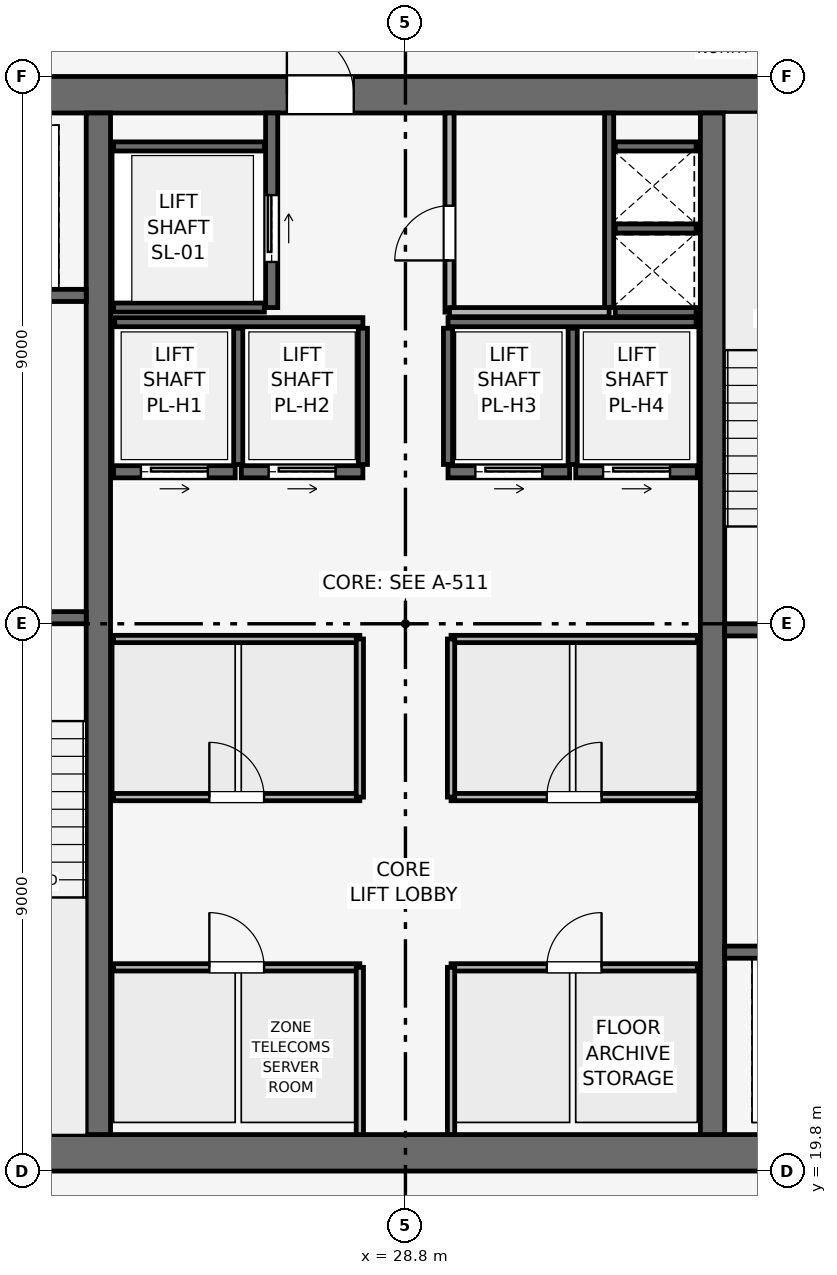
"""IFC4 building model, lengths in metres.
Left out: names, types, materials, properties, quantities, classifications, styles, units other than length and angle.
Written with IfcOpenShell. Run it as: python <this file> out.ifc"""

import sys

from ifc_helpers import new_model, si_unit, direction, frame, frame_2d, origin, place, context, subcontext, project, spatial, rectangle, extrude, element, fill, save


model = new_model("IFC4")
c1 = context("Model", 3, precision=1e-05, world=origin(), true_north=direction((0.0, 1.0)))
c2 = subcontext(c1, "Body", "Model", "MODEL_VIEW")
j1 = project(units=[si_unit("LENGTHUNIT", "METRE"), si_unit("PLANEANGLEUNIT", "RADIAN")], contexts=[c1])
p1 = place(None, origin())
s1 = spatial("IfcSite", under=j1, at=p1, CompositionType="ELEMENT")
p2 = place(p1, origin())
s2 = spatial("IfcBuilding", under=s1, at=p2, CompositionType="ELEMENT")
p3 = place(p2, frame((0.0, 0.0, 321.75)))
s3 = spatial("IfcBuildingStorey", under=s2, at=p3, CompositionType="ELEMENT", Elevation=321.75)
p4 = place(p3, frame((19.8, 20.1, 0.0), z_axis=(0.0, 0.0, 1.0), x_axis=(1.0, 0.0, 0.0)))
e1 = element("IfcWall", 1, at=p4, inside=s3, PredefinedType="SHEAR", context=c2, shape_type="SweptSolid", body=[
    extrude(rectangle(XDim=18.0, YDim=0.6, at=frame_2d((9.0, 0.0))), origin(), (0.0, 0.0, 1.0), 3.75),
])
p5 = place(p3, frame((19.8, 37.5, 0.0), z_axis=(0.0, 0.0, 1.0), x_axis=(1.0, 0.0, 0.0)))
e2 = element("IfcWall", 2, at=p5, inside=s3, PredefinedType="SHEAR", context=c2, shape_type="SweptSolid", body=[
    extrude(rectangle(XDim=18.0, YDim=0.6, at=frame_2d((9.0, 0.0))), origin(), (0.0, 0.0, 1.0), 3.75),
])
p6 = place(p5, frame((7.05, 0.0, 0.0)))
e3 = element("IfcOpeningElement", 3, at=p6, cuts=e2, PredefinedType="OPENING", context=c2, shape_type="SweptSolid", body=[
    extrude(rectangle(XDim=1.1, YDim=2.15, at=frame_2d((0.55, 1.075))), frame((0.0, 0.31, 0.0), z_axis=(0.0, -1.0, 0.0), x_axis=(1.0, 0.0, 0.0)), (0.0, 0.0, 1.0), 0.62),
])
for number, where, z_axis, x_axis in (
    (4, (23.75, 20.4, 0.0), (0.0, 0.0, 1.0), (0.0, 1.0, 0.0)),
    (5, (33.85, 20.4, 0.0), (0.0, 0.0, 1.0), (0.0, 1.0, 0.0)),
):
    element("IfcWall", number, at=place(p3, frame(where, z_axis=z_axis, x_axis=x_axis)), inside=s3, PredefinedType="SHEAR", context=c2, shape_type="SweptSolid", body=[
        extrude(rectangle(XDim=16.8, YDim=0.4, at=frame_2d((8.4, 0.0))), origin(), (0.0, 0.0, 1.0), 3.75),
    ])
p7 = place(p3, frame((20.4, 28.9, 0.0), z_axis=(0.0, 0.0, 1.0), x_axis=(1.0, 0.0, 0.0)))
e6 = element("IfcWall", 6, at=p7, inside=s3, PredefinedType="SHEAR", context=c2, shape_type="SweptSolid", body=[
    extrude(rectangle(XDim=3.15, YDim=0.2, at=frame_2d((1.575, 0.0))), origin(), (0.0, 0.0, 1.0), 3.51),
])
p8 = place(p7, frame((0.8, 0.0, 0.0)))
e7 = element("IfcOpeningElement", 7, at=p8, cuts=e6, PredefinedType="OPENING", context=c2, shape_type="SweptSolid", body=[
    extrude(rectangle(XDim=1.0, YDim=2.1, at=frame_2d((0.5, 1.05))), frame((0.0, 0.11, 0.0), z_axis=(0.0, -1.0, 0.0), x_axis=(1.0, 0.0, 0.0)), (0.0, 0.0, 1.0), 0.22),
])
p9 = place(p3, frame((34.05, 28.7, 0.0), z_axis=(0.0, 0.0, 1.0), x_axis=(1.0, 0.0, 0.0)))
e8 = element("IfcWall", 8, at=p9, inside=s3, PredefinedType="SHEAR", context=c2, shape_type="SweptSolid", body=[
    extrude(rectangle(XDim=3.15, YDim=0.2, at=frame_2d((1.575, 0.0))), origin(), (0.0, 0.0, 1.0), 3.51),
])
p10 = place(p9, frame((0.8, 0.0, 0.0)))
e9 = element("IfcOpeningElement", 9, at=p10, cuts=e8, PredefinedType="OPENING", context=c2, shape_type="SweptSolid", body=[
    extrude(rectangle(XDim=1.0, YDim=2.1, at=frame_2d((0.5, 1.05))), frame((0.0, 0.11, 0.0), z_axis=(0.0, -1.0, 0.0), x_axis=(1.0, 0.0, 0.0)), (0.0, 0.0, 1.0), 0.22),
])
p11 = place(p3, frame((32.15, 34.0, 0.0), z_axis=(0.0, 0.0, 1.0), x_axis=(0.0, 1.0, 0.0)))
e10 = element("IfcWall", 10, at=p11, inside=s3, PredefinedType="SHEAR", context=c2, shape_type="SweptSolid", body=[
    extrude(rectangle(XDim=3.2, YDim=0.15, at=frame_2d((1.6, 0.0))), origin(), (0.0, 0.0, 1.0), 3.51),
])
for number, where, z_axis, x_axis in (
    (11, (32.25, 33.925, 0.0), (0.0, 0.0, 1.0), (1.0, 0.0, 0.0)),
    (12, (32.25, 35.3, 0.0), (0.0, 0.0, 1.0), (1.0, 0.0, 0.0)),
):
    element("IfcWall", number, at=place(p3, frame(where, z_axis=z_axis, x_axis=x_axis)), inside=s3, PredefinedType="SHEAR", context=c2, shape_type="SweptSolid", body=[
        extrude(rectangle(XDim=1.33, YDim=0.15, at=frame_2d((0.665, 0.0))), origin(), (0.0, 0.0, 1.0), 3.51),
    ])
p12 = place(p3, frame((20.5, 34.2, 0.0), z_axis=(0.0, 0.0, 1.0), x_axis=(1.0, 0.0, 0.0)))
e13 = element("IfcWall", 13, at=p12, inside=s3, PredefinedType="SHEAR", context=c2, shape_type="SweptSolid", body=[
    extrude(rectangle(XDim=3.05, YDim=0.2, at=frame_2d((1.525, 0.0))), origin(), (0.0, 0.0, 1.0), 3.51),
])
p13 = place(p12, frame((0.75, 0.0, 0.0)))
e14 = element("IfcOpeningElement", 14, at=p13, cuts=e13, PredefinedType="OPENING", context=c2, shape_type="SweptSolid", body=[
    extrude(rectangle(XDim=1.1, YDim=2.15, at=frame_2d((0.55, 1.075))), frame((0.0, 0.11, 0.0), z_axis=(0.0, -1.0, 0.0), x_axis=(1.0, 0.0, 0.0)), (0.0, 0.0, 1.0), 0.22),
])
p14 = place(p3, frame((34.05, 23.4, 0.0), z_axis=(0.0, 0.0, 1.0), x_axis=(1.0, 0.0, 0.0)))
e15 = element("IfcWall", 15, at=p14, inside=s3, PredefinedType="SHEAR", context=c2, shape_type="SweptSolid", body=[
    extrude(rectangle(XDim=3.05, YDim=0.2, at=frame_2d((1.525, 0.0))), origin(), (0.0, 0.0, 1.0), 3.51),
])
p15 = place(p14, frame((1.2, 0.0, 0.0)))
e16 = element("IfcOpeningElement", 16, at=p15, cuts=e15, PredefinedType="OPENING", context=c2, shape_type="SweptSolid", body=[
    extrude(rectangle(XDim=1.1, YDim=2.15, at=frame_2d((0.55, 1.075))), frame((0.0, 0.11, 0.0), z_axis=(0.0, -1.0, 0.0), x_axis=(1.0, 0.0, 0.0)), (0.0, 0.0, 1.0), 0.22),
])
p16 = place(p3, frame((26.6, 34.0, 0.0), z_axis=(0.0, 0.0, 1.0), x_axis=(0.0, 1.0, 0.0)))
e17 = element("IfcWall", 17, at=p16, inside=s3, PredefinedType="SHEAR", context=c2, shape_type="SweptSolid", body=[
    extrude(rectangle(XDim=3.2, YDim=0.2, at=frame_2d((1.6, 0.0))), origin(), (0.0, 0.0, 1.0), 3.51),
])
p17 = place(p16, frame((0.75, 0.0, 0.0)))
e18 = element("IfcOpeningElement", 18, at=p17, cuts=e17, PredefinedType="OPENING", context=c2, shape_type="SweptSolid", body=[
    extrude(rectangle(XDim=1.1, YDim=2.15, at=frame_2d((0.55, 1.075))), frame((0.0, 0.11, 0.0), z_axis=(0.0, -1.0, 0.0), x_axis=(1.0, 0.0, 0.0)), (0.0, 0.0, 1.0), 0.22),
])
for number, where, z_axis, x_axis in (
    (19, (24.0, 34.0, 0.0), (0.0, 0.0, 1.0), (1.0, 0.0, 0.0)),
    (20, (24.0, 36.65, 0.0), (0.0, 0.0, 1.0), (1.0, 0.0, 0.0)),
):
    element("IfcWall", number, at=place(p3, frame(where, z_axis=z_axis, x_axis=x_axis)), inside=s3, PredefinedType="SHEAR", context=c2, shape_type="SweptSolid", body=[
        extrude(rectangle(XDim=2.48, YDim=0.15, at=frame_2d((1.24, 0.0))), origin(), (0.0, 0.0, 1.0), 3.51),
    ])
p18 = place(p3, frame((24.0, 31.3, 0.0), z_axis=(0.0, 0.0, 1.0), x_axis=(1.0, 0.0, 0.0)))
e21 = element("IfcWall", 21, at=p18, inside=s3, PredefinedType="SHEAR", context=c2, shape_type="SweptSolid", body=[
    extrude(rectangle(XDim=2.0, YDim=0.2, at=frame_2d((1.0, 0.0))), origin(), (0.0, 0.0, 1.0), 3.51),
])
p19 = place(p18, frame((0.45, 0.0, 0.0)))
e22 = element("IfcOpeningElement", 22, at=p19, cuts=e21, PredefinedType="OPENING", context=c2, shape_type="SweptSolid", body=[
    extrude(rectangle(XDim=1.1, YDim=2.15, at=frame_2d((0.55, 1.075))), frame((0.0, 0.11, 0.0), z_axis=(0.0, -1.0, 0.0), x_axis=(1.0, 0.0, 0.0)), (0.0, 0.0, 1.0), 0.22),
])
p20 = place(p3, frame((26.1, 31.3, 0.0), z_axis=(0.0, 0.0, 1.0), x_axis=(1.0, 0.0, 0.0)))
e23 = element("IfcWall", 23, at=p20, inside=s3, PredefinedType="SHEAR", context=c2, shape_type="SweptSolid", body=[
    extrude(rectangle(XDim=2.0, YDim=0.2, at=frame_2d((1.0, 0.0))), origin(), (0.0, 0.0, 1.0), 3.51),
])
p21 = place(p20, frame((0.45, 0.0, 0.0)))
e24 = element("IfcOpeningElement", 24, at=p21, cuts=e23, PredefinedType="OPENING", context=c2, shape_type="SweptSolid", body=[
    extrude(rectangle(XDim=1.1, YDim=2.15, at=frame_2d((0.55, 1.075))), frame((0.0, 0.11, 0.0), z_axis=(0.0, -1.0, 0.0), x_axis=(1.0, 0.0, 0.0)), (0.0, 0.0, 1.0), 0.22),
])
p22 = place(p3, frame((29.5, 31.3, 0.0), z_axis=(0.0, 0.0, 1.0), x_axis=(1.0, 0.0, 0.0)))
e25 = element("IfcWall", 25, at=p22, inside=s3, PredefinedType="SHEAR", context=c2, shape_type="SweptSolid", body=[
    extrude(rectangle(XDim=2.0, YDim=0.2, at=frame_2d((1.0, 0.0))), origin(), (0.0, 0.0, 1.0), 3.51),
])
p23 = place(p22, frame((0.45, 0.0, 0.0)))
e26 = element("IfcOpeningElement", 26, at=p23, cuts=e25, PredefinedType="OPENING", context=c2, shape_type="SweptSolid", body=[
    extrude(rectangle(XDim=1.1, YDim=2.15, at=frame_2d((0.55, 1.075))), frame((0.0, 0.11, 0.0), z_axis=(0.0, -1.0, 0.0), x_axis=(1.0, 0.0, 0.0)), (0.0, 0.0, 1.0), 0.22),
])
p24 = place(p3, frame((31.6, 31.3, 0.0), z_axis=(0.0, 0.0, 1.0), x_axis=(1.0, 0.0, 0.0)))
e27 = element("IfcWall", 27, at=p24, inside=s3, PredefinedType="SHEAR", context=c2, shape_type="SweptSolid", body=[
    extrude(rectangle(XDim=2.0, YDim=0.2, at=frame_2d((1.0, 0.0))), origin(), (0.0, 0.0, 1.0), 3.51),
])
p25 = place(p24, frame((0.45, 0.0, 0.0)))
e28 = element("IfcOpeningElement", 28, at=p25, cuts=e27, PredefinedType="OPENING", context=c2, shape_type="SweptSolid", body=[
    extrude(rectangle(XDim=1.1, YDim=2.15, at=frame_2d((0.55, 1.075))), frame((0.0, 0.11, 0.0), z_axis=(0.0, -1.0, 0.0), x_axis=(1.0, 0.0, 0.0)), (0.0, 0.0, 1.0), 0.22),
])
p26 = place(p3, frame((32.25, 36.65, 0.0), z_axis=(0.0, 0.0, 1.0), x_axis=(1.0, 0.0, 0.0)))
e29 = element("IfcWall", 29, at=p26, inside=s3, PredefinedType="SHEAR", context=c2, shape_type="SweptSolid", body=[
    extrude(rectangle(XDim=1.33, YDim=0.15, at=frame_2d((0.665, 0.0))), origin(), (0.0, 0.0, 1.0), 3.51),
])
for number, where, z_axis, x_axis in (
    (30, (24.02, 33.76, 0.0), (0.0, 0.0, 1.0), (1.0, 0.0, 0.0)),
    (31, (29.5, 33.76, 0.0), (0.0, 0.0, 1.0), (1.0, 0.0, 0.0)),
):
    element("IfcWall", number, at=place(p3, frame(where, z_axis=z_axis, x_axis=x_axis)), inside=s3, PredefinedType="SHEAR", context=c2, shape_type="SweptSolid", body=[
        extrude(rectangle(XDim=4.08, YDim=0.15, at=frame_2d((2.04, 0.0))), origin(), (0.0, 0.0, 1.0), 3.51),
    ])
for number, where, z_axis, x_axis in (
    (32, (26.05, 31.42, 0.0), (0.0, 0.0, 1.0), (0.0, 1.0, 0.0)),
    (33, (28.1, 31.42, 0.0), (0.0, 0.0, 1.0), (0.0, 1.0, 0.0)),
    (34, (29.5, 31.42, 0.0), (0.0, 0.0, 1.0), (0.0, 1.0, 0.0)),
    (35, (31.55, 31.42, 0.0), (0.0, 0.0, 1.0), (0.0, 1.0, 0.0)),
):
    element("IfcWall", number, at=place(p3, frame(where, z_axis=z_axis, x_axis=x_axis)), inside=s3, PredefinedType="SHEAR", context=c2, shape_type="SweptSolid", body=[
        extrude(rectangle(XDim=2.24, YDim=0.15, at=frame_2d((1.12, 0.0))), origin(), (0.0, 0.0, 1.0), 3.51),
    ])
p27 = place(p3, frame((29.525, 33.925, 0.0), z_axis=(0.0, 0.0, 1.0), x_axis=(0.0, 1.0, 0.0)))
e36 = element("IfcWall", 36, at=p27, inside=s3, PredefinedType="PARTITIONING", context=c2, shape_type="SweptSolid", body=[
    extrude(rectangle(XDim=3.275, YDim=0.15, at=frame_2d((1.637, 0.0))), origin(), (0.0, 0.0, 1.0), 3.51),
])
p28 = place(p27, frame((0.85, 0.0, 0.0)))
e37 = element("IfcOpeningElement", 37, at=p28, cuts=e36, PredefinedType="OPENING", context=c2, shape_type="SweptSolid", body=[
    extrude(rectangle(XDim=0.9, YDim=2.1, at=frame_2d((0.45, 1.05))), frame((0.0, 0.085, 0.0), z_axis=(0.0, -1.0, 0.0), x_axis=(1.0, 0.0, 0.0)), (0.0, 0.0, 1.0), 0.17),
])
p29 = place(p3, frame((29.525, 33.925, 0.0), z_axis=(0.0, 0.0, 1.0), x_axis=(1.0, 0.0, 0.0)))
e38 = element("IfcWall", 38, at=p29, inside=s3, PredefinedType="PARTITIONING", context=c2, shape_type="SweptSolid", body=[
    extrude(rectangle(XDim=2.625, YDim=0.15, at=frame_2d((1.312, 0.0))), origin(), (0.0, 0.0, 1.0), 3.51),
])
p30 = place(p3, frame((24.0, 23.15, 0.0), z_axis=(0.0, 0.0, 1.0), x_axis=(1.0, 0.0, 0.0)))
e39 = element("IfcWall", 39, at=p30, inside=s3, PredefinedType="PARTITIONING", context=c2, shape_type="SweptSolid", body=[
    extrude(rectangle(XDim=4.05, YDim=0.12, at=frame_2d((2.025, 0.0))), origin(), (0.0, 0.0, 1.0), 3.51),
])
p31 = place(p30, frame((1.575, 0.0, 0.0)))
e40 = element("IfcOpeningElement", 40, at=p31, cuts=e39, PredefinedType="OPENING", context=c2, shape_type="SweptSolid", body=[
    extrude(rectangle(XDim=0.9, YDim=2.1, at=frame_2d((0.45, 1.05))), frame((0.0, 0.07, 0.0), z_axis=(0.0, -1.0, 0.0), x_axis=(1.0, 0.0, 0.0)), (0.0, 0.0, 1.0), 0.14),
])
p32 = place(p3, frame((28.05, 20.4, 0.0), z_axis=(0.0, 0.0, 1.0), x_axis=(0.0, 1.0, 0.0)))
e41 = element("IfcWall", 41, at=p32, inside=s3, PredefinedType="PARTITIONING", context=c2, shape_type="SweptSolid", body=[
    extrude(rectangle(XDim=2.75, YDim=0.12, at=frame_2d((1.375, 0.0))), origin(), (0.0, 0.0, 1.0), 3.51),
])
p33 = place(p3, frame((29.55, 23.15, 0.0), z_axis=(0.0, 0.0, 1.0), x_axis=(1.0, 0.0, 0.0)))
e42 = element("IfcWall", 42, at=p33, inside=s3, PredefinedType="PARTITIONING", context=c2, shape_type="SweptSolid", body=[
    extrude(rectangle(XDim=4.05, YDim=0.12, at=frame_2d((2.025, 0.0))), origin(), (0.0, 0.0, 1.0), 3.51),
])
p34 = place(p33, frame((1.575, 0.0, 0.0)))
e43 = element("IfcOpeningElement", 43, at=p34, cuts=e42, PredefinedType="OPENING", context=c2, shape_type="SweptSolid", body=[
    extrude(rectangle(XDim=0.9, YDim=2.1, at=frame_2d((0.45, 1.05))), frame((0.0, 0.07, 0.0), z_axis=(0.0, -1.0, 0.0), x_axis=(1.0, 0.0, 0.0)), (0.0, 0.0, 1.0), 0.14),
])
p35 = place(p3, frame((29.55, 20.4, 0.0), z_axis=(0.0, 0.0, 1.0), x_axis=(0.0, 1.0, 0.0)))
e44 = element("IfcWall", 44, at=p35, inside=s3, PredefinedType="PARTITIONING", context=c2, shape_type="SweptSolid", body=[
    extrude(rectangle(XDim=2.75, YDim=0.12, at=frame_2d((1.375, 0.0))), origin(), (0.0, 0.0, 1.0), 3.51),
])
p36 = place(p3, frame((24.0, 25.95, 0.0), z_axis=(0.0, 0.0, 1.0), x_axis=(1.0, 0.0, 0.0)))
e45 = element("IfcWall", 45, at=p36, inside=s3, PredefinedType="PARTITIONING", context=c2, shape_type="SweptSolid", body=[
    extrude(rectangle(XDim=4.05, YDim=0.12, at=frame_2d((2.025, 0.0))), origin(), (0.0, 0.0, 1.0), 3.51),
])
p37 = place(p36, frame((1.575, 0.0, 0.0)))
e46 = element("IfcOpeningElement", 46, at=p37, cuts=e45, PredefinedType="OPENING", context=c2, shape_type="SweptSolid", body=[
    extrude(rectangle(XDim=0.9, YDim=2.1, at=frame_2d((0.45, 1.05))), frame((0.0, 0.07, 0.0), z_axis=(0.0, -1.0, 0.0), x_axis=(1.0, 0.0, 0.0)), (0.0, 0.0, 1.0), 0.14),
])
p38 = place(p3, frame((24.0, 28.55, 0.0), z_axis=(0.0, 0.0, 1.0), x_axis=(1.0, 0.0, 0.0)))
e47 = element("IfcWall", 47, at=p38, inside=s3, PredefinedType="PARTITIONING", context=c2, shape_type="SweptSolid", body=[
    extrude(rectangle(XDim=4.05, YDim=0.12, at=frame_2d((2.025, 0.0))), origin(), (0.0, 0.0, 1.0), 3.51),
])
p39 = place(p3, frame((28.05, 25.95, 0.0), z_axis=(0.0, 0.0, 1.0), x_axis=(0.0, 1.0, 0.0)))
e48 = element("IfcWall", 48, at=p39, inside=s3, PredefinedType="PARTITIONING", context=c2, shape_type="SweptSolid", body=[
    extrude(rectangle(XDim=2.6, YDim=0.12, at=frame_2d((1.3, 0.0))), origin(), (0.0, 0.0, 1.0), 3.51),
])
p40 = place(p3, frame((29.55, 25.95, 0.0), z_axis=(0.0, 0.0, 1.0), x_axis=(1.0, 0.0, 0.0)))
e49 = element("IfcWall", 49, at=p40, inside=s3, PredefinedType="PARTITIONING", context=c2, shape_type="SweptSolid", body=[
    extrude(rectangle(XDim=4.05, YDim=0.12, at=frame_2d((2.025, 0.0))), origin(), (0.0, 0.0, 1.0), 3.51),
])
p41 = place(p40, frame((1.575, 0.0, 0.0)))
e50 = element("IfcOpeningElement", 50, at=p41, cuts=e49, PredefinedType="OPENING", context=c2, shape_type="SweptSolid", body=[
    extrude(rectangle(XDim=0.9, YDim=2.1, at=frame_2d((0.45, 1.05))), frame((0.0, 0.07, 0.0), z_axis=(0.0, -1.0, 0.0), x_axis=(1.0, 0.0, 0.0)), (0.0, 0.0, 1.0), 0.14),
])
p42 = place(p3, frame((29.55, 28.55, 0.0), z_axis=(0.0, 0.0, 1.0), x_axis=(1.0, 0.0, 0.0)))
e51 = element("IfcWall", 51, at=p42, inside=s3, PredefinedType="PARTITIONING", context=c2, shape_type="SweptSolid", body=[
    extrude(rectangle(XDim=4.05, YDim=0.12, at=frame_2d((2.025, 0.0))), origin(), (0.0, 0.0, 1.0), 3.51),
])
p43 = place(p3, frame((29.55, 25.95, 0.0), z_axis=(0.0, 0.0, 1.0), x_axis=(0.0, 1.0, 0.0)))
e52 = element("IfcWall", 52, at=p43, inside=s3, PredefinedType="PARTITIONING", context=c2, shape_type="SweptSolid", body=[
    extrude(rectangle(XDim=2.6, YDim=0.12, at=frame_2d((1.3, 0.0))), origin(), (0.0, 0.0, 1.0), 3.51),
])
p44 = place(p17, origin())
e53 = element("IfcDoor", 53, at=p44, inside=s3, OperationType="SLIDING_TO_RIGHT", PredefinedType="DOOR", context=c2, shape_type="SweptSolid", body=[
    extrude(rectangle(XDim=1.1, YDim=2.15, at=frame_2d((0.55, 1.075))), frame((0.0, 0.025, 0.0), z_axis=(0.0, -1.0, 0.0), x_axis=(1.0, 0.0, 0.0)), (0.0, 0.0, 1.0), 0.05),
])
fill(e18, e53)
p45 = place(p19, origin())
e54 = element("IfcDoor", 54, at=p45, inside=s3, OperationType="SLIDING_TO_RIGHT", PredefinedType="DOOR", context=c2, shape_type="SweptSolid", body=[
    extrude(rectangle(XDim=1.1, YDim=2.15, at=frame_2d((0.55, 1.075))), frame((0.0, 0.025, 0.0), z_axis=(0.0, -1.0, 0.0), x_axis=(1.0, 0.0, 0.0)), (0.0, 0.0, 1.0), 0.05),
])
fill(e22, e54)
p46 = place(p21, origin())
e55 = element("IfcDoor", 55, at=p46, inside=s3, OperationType="SLIDING_TO_RIGHT", PredefinedType="DOOR", context=c2, shape_type="SweptSolid", body=[
    extrude(rectangle(XDim=1.1, YDim=2.15, at=frame_2d((0.55, 1.075))), frame((0.0, 0.025, 0.0), z_axis=(0.0, -1.0, 0.0), x_axis=(1.0, 0.0, 0.0)), (0.0, 0.0, 1.0), 0.05),
])
fill(e24, e55)
p47 = place(p23, origin())
e56 = element("IfcDoor", 56, at=p47, inside=s3, OperationType="SLIDING_TO_RIGHT", PredefinedType="DOOR", context=c2, shape_type="SweptSolid", body=[
    extrude(rectangle(XDim=1.1, YDim=2.15, at=frame_2d((0.55, 1.075))), frame((0.0, 0.025, 0.0), z_axis=(0.0, -1.0, 0.0), x_axis=(1.0, 0.0, 0.0)), (0.0, 0.0, 1.0), 0.05),
])
fill(e26, e56)
p48 = place(p25, origin())
e57 = element("IfcDoor", 57, at=p48, inside=s3, OperationType="SLIDING_TO_RIGHT", PredefinedType="DOOR", context=c2, shape_type="SweptSolid", body=[
    extrude(rectangle(XDim=1.1, YDim=2.15, at=frame_2d((0.55, 1.075))), frame((0.0, 0.025, 0.0), z_axis=(0.0, -1.0, 0.0), x_axis=(1.0, 0.0, 0.0)), (0.0, 0.0, 1.0), 0.05),
])
fill(e28, e57)
p49 = place(p28, origin())
e58 = element("IfcDoor", 58, at=p49, inside=s3, OperationType="SINGLE_SWING_LEFT", PredefinedType="DOOR", context=c2, shape_type="SweptSolid", body=[
    extrude(rectangle(XDim=0.9, YDim=2.1, at=frame_2d((0.45, 1.05))), frame((0.0, 0.025, 0.0), z_axis=(0.0, -1.0, 0.0), x_axis=(1.0, 0.0, 0.0)), (0.0, 0.0, 1.0), 0.05),
])
fill(e37, e58)
p50 = place(p31, origin())
e59 = element("IfcDoor", 59, at=p50, inside=s3, OperationType="SINGLE_SWING_LEFT", PredefinedType="DOOR", context=c2, shape_type="SweptSolid", body=[
    extrude(rectangle(XDim=0.9, YDim=2.1, at=frame_2d((0.45, 1.05))), frame((0.0, 0.025, 0.0), z_axis=(0.0, -1.0, 0.0), x_axis=(1.0, 0.0, 0.0)), (0.0, 0.0, 1.0), 0.05),
])
fill(e40, e59)
p51 = place(p34, origin())
e60 = element("IfcDoor", 60, at=p51, inside=s3, OperationType="SINGLE_SWING_RIGHT", PredefinedType="DOOR", context=c2, shape_type="SweptSolid", body=[
    extrude(rectangle(XDim=0.9, YDim=2.1, at=frame_2d((0.45, 1.05))), frame((0.0, 0.025, 0.0), z_axis=(0.0, -1.0, 0.0), x_axis=(1.0, 0.0, 0.0)), (0.0, 0.0, 1.0), 0.05),
])
fill(e43, e60)
p52 = place(p37, origin())
e61 = element("IfcDoor", 61, at=p52, inside=s3, OperationType="SINGLE_SWING_LEFT", PredefinedType="DOOR", context=c2, shape_type="SweptSolid", body=[
    extrude(rectangle(XDim=0.9, YDim=2.1, at=frame_2d((0.45, 1.05))), frame((0.0, 0.025, 0.0), z_axis=(0.0, -1.0, 0.0), x_axis=(1.0, 0.0, 0.0)), (0.0, 0.0, 1.0), 0.05),
])
fill(e46, e61)
p53 = place(p41, origin())
e62 = element("IfcDoor", 62, at=p53, inside=s3, OperationType="SINGLE_SWING_RIGHT", PredefinedType="DOOR", context=c2, shape_type="SweptSolid", body=[
    extrude(rectangle(XDim=0.9, YDim=2.1, at=frame_2d((0.45, 1.05))), frame((0.0, 0.025, 0.0), z_axis=(0.0, -1.0, 0.0), x_axis=(1.0, 0.0, 0.0)), (0.0, 0.0, 1.0), 0.05),
])
fill(e50, e62)
p54 = place(p6, origin())
e63 = element("IfcDoor", 63, at=p54, inside=s3, OperationType="SINGLE_SWING_LEFT", PredefinedType="DOOR", context=c2, shape_type="SweptSolid", body=[
    extrude(rectangle(XDim=1.1, YDim=2.15, at=frame_2d((0.55, 1.075))), frame((0.0, 0.025, 0.0), z_axis=(0.0, -1.0, 0.0), x_axis=(1.0, 0.0, 0.0)), (0.0, 0.0, 1.0), 0.05),
])
fill(e3, e63)
save(model, sys.argv[1])
